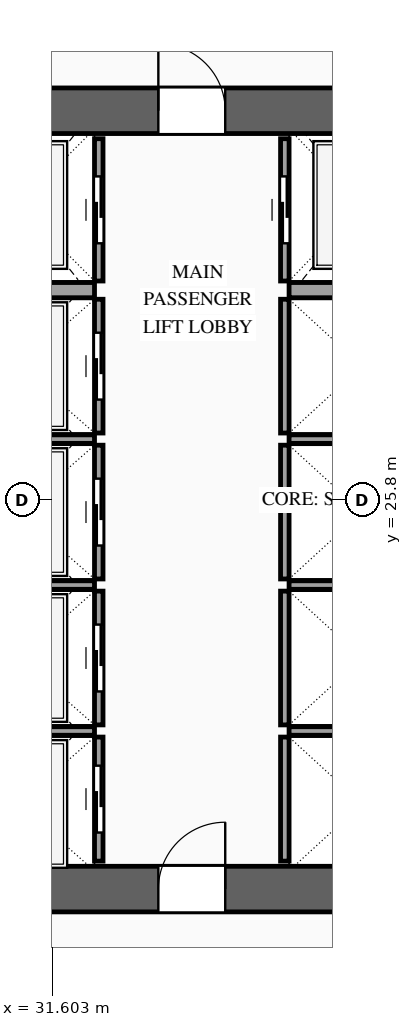
"""IFC4 building model, lengths in metres.
Left out: names, types, materials, properties, quantities, classifications, styles, units other than length and angle.
Written with IfcOpenShell. Run it as: python <this file> out.ifc"""

import sys

from ifc_helpers import new_model, si_unit, direction, frame, frame_2d, origin, place, context, subcontext, project, spatial, rectangle, extrude, source, transform, mapped, element, fill, save


model = new_model("IFC4")
c1 = context("Model", 3, precision=1e-05, world=origin(), true_north=direction((0.0, 1.0)))
c2 = subcontext(c1, "Body", "Model", "MODEL_VIEW")
j1 = project(units=[si_unit("LENGTHUNIT", "METRE"), si_unit("PLANEANGLEUNIT", "RADIAN")], contexts=[c1])
p1 = place(None, origin())
s1 = spatial("IfcSite", under=j1, at=p1, CompositionType="ELEMENT")
p2 = place(p1, origin())
s2 = spatial("IfcBuilding", under=s1, at=p2, CompositionType="ELEMENT")
p3 = place(p2, frame((0.0, 0.0, 159.6)))
s3 = spatial("IfcBuildingStorey", under=s2, at=p3, CompositionType="ELEMENT", Elevation=159.6)
p4 = place(p3, frame((23.425, 19.4, 0.0), z_axis=(0.0, 0.0, 1.0), x_axis=(1.0, 0.0, 0.0)))
e1 = element("IfcWall", 1, at=p4, inside=s3, PredefinedType="SHEAR", context=c2, shape_type="SweptSolid", body=[
    extrude(rectangle(XDim=27.15, YDim=0.75, at=frame_2d((13.575, 0.0))), origin(), (0.0, 0.0, 1.0), 3.6),
])
p5 = place(p4, frame((2.025, 0.0, 0.0)))
e2 = element("IfcOpeningElement", 2, at=p5, cuts=e1, PredefinedType="OPENING", context=c2, shape_type="SweptSolid", body=[
    extrude(rectangle(XDim=1.1, YDim=2.2, at=frame_2d((0.55, 1.1))), frame((0.0, 0.39, 0.0), z_axis=(0.0, -1.0, 0.0), x_axis=(1.0, 0.0, 0.0)), (0.0, 0.0, 1.0), 0.78),
])
p6 = place(p4, frame((9.925, 0.0, 0.0)))
e3 = element("IfcOpeningElement", 3, at=p6, cuts=e1, PredefinedType="OPENING", context=c2, shape_type="SweptSolid", body=[
    extrude(rectangle(XDim=1.1, YDim=2.2, at=frame_2d((0.55, 1.1))), frame((0.0, 0.39, 0.0), z_axis=(0.0, -1.0, 0.0), x_axis=(1.0, 0.0, 0.0)), (0.0, 0.0, 1.0), 0.78),
])
p7 = place(p4, frame((23.125, 0.0, 0.0)))
e4 = element("IfcOpeningElement", 4, at=p7, cuts=e1, PredefinedType="OPENING", context=c2, shape_type="SweptSolid", body=[
    extrude(rectangle(XDim=1.1, YDim=2.2, at=frame_2d((0.55, 1.1))), frame((0.0, 0.39, 0.0), z_axis=(0.0, -1.0, 0.0), x_axis=(1.0, 0.0, 0.0)), (0.0, 0.0, 1.0), 0.78),
])
p8 = place(p4, frame((19.745, 0.0, 0.0)))
e5 = element("IfcOpeningElement", 5, at=p8, cuts=e1, PredefinedType="OPENING", context=c2, shape_type="SweptSolid", body=[
    extrude(rectangle(XDim=0.9, YDim=2.15, at=frame_2d((0.45, 1.075))), frame((0.0, 0.39, 0.0), z_axis=(0.0, -1.0, 0.0), x_axis=(1.0, 0.0, 0.0)), (0.0, 0.0, 1.0), 0.78),
])
p9 = place(p4, frame((18.305, 0.0, 0.0)))
e6 = element("IfcOpeningElement", 6, at=p9, cuts=e1, PredefinedType="OPENING", context=c2, shape_type="SweptSolid", body=[
    extrude(rectangle(XDim=0.9, YDim=2.15, at=frame_2d((0.45, 1.075))), frame((0.0, 0.39, 0.0), z_axis=(0.0, -1.0, 0.0), x_axis=(1.0, 0.0, 0.0)), (0.0, 0.0, 1.0), 0.78),
])
p10 = place(p3, frame((23.425, 32.2, 0.0), z_axis=(0.0, 0.0, 1.0), x_axis=(1.0, 0.0, 0.0)))
e7 = element("IfcWall", 7, at=p10, inside=s3, PredefinedType="SHEAR", context=c2, shape_type="SweptSolid", body=[
    extrude(rectangle(XDim=27.15, YDim=0.75, at=frame_2d((13.575, 0.0))), origin(), (0.0, 0.0, 1.0), 3.6),
])
p11 = place(p10, frame((4.645, 0.0, 0.0)))
e8 = element("IfcOpeningElement", 8, at=p11, cuts=e7, PredefinedType="OPENING", context=c2, shape_type="SweptSolid", body=[
    extrude(rectangle(XDim=0.9, YDim=2.15, at=frame_2d((0.45, 1.075))), frame((0.0, 0.39, 0.0), z_axis=(0.0, -1.0, 0.0), x_axis=(1.0, 0.0, 0.0)), (0.0, 0.0, 1.0), 0.78),
])
p12 = place(p10, frame((9.925, 0.0, 0.0)))
e9 = element("IfcOpeningElement", 9, at=p12, cuts=e7, PredefinedType="OPENING", context=c2, shape_type="SweptSolid", body=[
    extrude(rectangle(XDim=1.1, YDim=2.2, at=frame_2d((0.55, 1.1))), frame((0.0, 0.39, 0.0), z_axis=(0.0, -1.0, 0.0), x_axis=(1.0, 0.0, 0.0)), (0.0, 0.0, 1.0), 0.78),
])
p13 = place(p10, frame((15.775, 0.0, 0.0)))
e10 = element("IfcOpeningElement", 10, at=p13, cuts=e7, PredefinedType="OPENING", context=c2, shape_type="SweptSolid", body=[
    extrude(rectangle(XDim=1.1, YDim=2.2, at=frame_2d((0.55, 1.1))), frame((0.0, 0.39, 0.0), z_axis=(0.0, -1.0, 0.0), x_axis=(1.0, 0.0, 0.0)), (0.0, 0.0, 1.0), 0.78),
])
p14 = place(p10, frame((18.305, 0.0, 0.0)))
e11 = element("IfcOpeningElement", 11, at=p14, cuts=e7, PredefinedType="OPENING", context=c2, shape_type="SweptSolid", body=[
    extrude(rectangle(XDim=0.9, YDim=2.15, at=frame_2d((0.45, 1.075))), frame((0.0, 0.39, 0.0), z_axis=(0.0, -1.0, 0.0), x_axis=(1.0, 0.0, 0.0)), (0.0, 0.0, 1.0), 0.78),
])
p15 = place(p10, frame((19.745, 0.0, 0.0)))
e12 = element("IfcOpeningElement", 12, at=p15, cuts=e7, PredefinedType="OPENING", context=c2, shape_type="SweptSolid", body=[
    extrude(rectangle(XDim=0.9, YDim=2.15, at=frame_2d((0.45, 1.075))), frame((0.0, 0.39, 0.0), z_axis=(0.0, -1.0, 0.0), x_axis=(1.0, 0.0, 0.0)), (0.0, 0.0, 1.0), 0.78),
])
p16 = place(p3, frame((32.37, 19.86, 0.0), z_axis=(0.0, 0.0, 1.0), x_axis=(0.0, 1.0, 0.0)))
e13 = element("IfcWall", 13, at=p16, inside=s3, PredefinedType="SOLIDWALL", context=c2, shape_type="SweptSolid", body=[
    extrude(rectangle(XDim=2.04, YDim=0.14, at=frame_2d((1.02, 0.0))), origin(), (0.0, 0.0, 1.0), 3.38),
])
p17 = place(p16, frame((0.47, 0.0, 0.0)))
e14 = element("IfcOpeningElement", 14, at=p17, cuts=e13, PredefinedType="OPENING", context=c2, shape_type="SweptSolid", body=[
    extrude(rectangle(XDim=1.1, YDim=2.2, at=frame_2d((0.55, 1.1))), frame((0.0, 0.085, 0.0), z_axis=(0.0, -1.0, 0.0), x_axis=(1.0, 0.0, 0.0)), (0.0, 0.0, 1.0), 0.17),
])
m1 = source(origin(), c2, "Body", "SweptSolid", [
    extrude(rectangle(XDim=2.5, YDim=0.14, at=frame_2d((1.25, 0.0))), origin(), (0.0, 0.0, 1.0), 3.38),
])
p18 = place(p3, frame((29.8, 22.0, 0.0), z_axis=(0.0, 0.0, 1.0), x_axis=(1.0, 0.0, 0.0)))
e15 = element("IfcWall", 15, at=p18, inside=s3, PredefinedType="SOLIDWALL", context=c2, shape_type="MappedRepresentation", body=[
    mapped(m1, transform((0.0, 0.0, 0.0), scale=1.0)),
])
p19 = place(p3, frame((32.37, 22.1, 0.0), z_axis=(0.0, 0.0, 1.0), x_axis=(0.0, 1.0, 0.0)))
e16 = element("IfcWall", 16, at=p19, inside=s3, PredefinedType="SOLIDWALL", context=c2, shape_type="SweptSolid", body=[
    extrude(rectangle(XDim=2.2, YDim=0.14, at=frame_2d((1.1, 0.0))), origin(), (0.0, 0.0, 1.0), 3.38),
])
p20 = place(p19, frame((0.55, 0.0, 0.0)))
e17 = element("IfcOpeningElement", 17, at=p20, cuts=e16, PredefinedType="OPENING", context=c2, shape_type="SweptSolid", body=[
    extrude(rectangle(XDim=1.1, YDim=2.2, at=frame_2d((0.55, 1.1))), frame((0.0, 0.085, 0.0), z_axis=(0.0, -1.0, 0.0), x_axis=(1.0, 0.0, 0.0)), (0.0, 0.0, 1.0), 0.17),
])
p21 = place(p3, frame((29.8, 24.4, 0.0), z_axis=(0.0, 0.0, 1.0), x_axis=(1.0, 0.0, 0.0)))
e18 = element("IfcWall", 18, at=p21, inside=s3, PredefinedType="SOLIDWALL", context=c2, shape_type="MappedRepresentation", body=[
    mapped(m1, transform((0.0, 0.0, 0.0), scale=1.0)),
])
p22 = place(p3, frame((32.37, 24.5, 0.0), z_axis=(0.0, 0.0, 1.0), x_axis=(0.0, 1.0, 0.0)))
e19 = element("IfcWall", 19, at=p22, inside=s3, PredefinedType="SOLIDWALL", context=c2, shape_type="SweptSolid", body=[
    extrude(rectangle(XDim=2.2, YDim=0.14, at=frame_2d((1.1, 0.0))), origin(), (0.0, 0.0, 1.0), 3.38),
])
p23 = place(p22, frame((0.55, 0.0, 0.0)))
e20 = element("IfcOpeningElement", 20, at=p23, cuts=e19, PredefinedType="OPENING", context=c2, shape_type="SweptSolid", body=[
    extrude(rectangle(XDim=1.1, YDim=2.2, at=frame_2d((0.55, 1.1))), frame((0.0, 0.085, 0.0), z_axis=(0.0, -1.0, 0.0), x_axis=(1.0, 0.0, 0.0)), (0.0, 0.0, 1.0), 0.17),
])
p24 = place(p3, frame((29.8, 26.8, 0.0), z_axis=(0.0, 0.0, 1.0), x_axis=(1.0, 0.0, 0.0)))
e21 = element("IfcWall", 21, at=p24, inside=s3, PredefinedType="SOLIDWALL", context=c2, shape_type="MappedRepresentation", body=[
    mapped(m1, transform((0.0, 0.0, 0.0), scale=1.0)),
])
p25 = place(p3, frame((32.37, 26.9, 0.0), z_axis=(0.0, 0.0, 1.0), x_axis=(0.0, 1.0, 0.0)))
e22 = element("IfcWall", 22, at=p25, inside=s3, PredefinedType="SOLIDWALL", context=c2, shape_type="SweptSolid", body=[
    extrude(rectangle(XDim=2.2, YDim=0.14, at=frame_2d((1.1, 0.0))), origin(), (0.0, 0.0, 1.0), 3.38),
])
p26 = place(p25, frame((0.55, 0.0, 0.0)))
e23 = element("IfcOpeningElement", 23, at=p26, cuts=e22, PredefinedType="OPENING", context=c2, shape_type="SweptSolid", body=[
    extrude(rectangle(XDim=1.1, YDim=2.2, at=frame_2d((0.55, 1.1))), frame((0.0, 0.085, 0.0), z_axis=(0.0, -1.0, 0.0), x_axis=(1.0, 0.0, 0.0)), (0.0, 0.0, 1.0), 0.17),
])
p27 = place(p3, frame((32.37, 29.4, 0.0), z_axis=(0.0, 0.0, 1.0), x_axis=(0.0, 1.0, 0.0)))
e24 = element("IfcWall", 24, at=p27, inside=s3, PredefinedType="SOLIDWALL", context=c2, shape_type="SweptSolid", body=[
    extrude(rectangle(XDim=2.34, YDim=0.14, at=frame_2d((1.17, 0.0))), origin(), (0.0, 0.0, 1.0), 3.38),
])
p28 = place(p27, frame((0.62, 0.0, 0.0)))
e25 = element("IfcOpeningElement", 25, at=p28, cuts=e24, PredefinedType="OPENING", context=c2, shape_type="SweptSolid", body=[
    extrude(rectangle(XDim=1.1, YDim=2.2, at=frame_2d((0.55, 1.1))), frame((0.0, 0.085, 0.0), z_axis=(0.0, -1.0, 0.0), x_axis=(1.0, 0.0, 0.0)), (0.0, 0.0, 1.0), 0.17),
])
m2 = source(origin(), c2, "Body", "SweptSolid", [
    extrude(rectangle(XDim=2.5, YDim=0.25, at=frame_2d((1.25, 0.0))), origin(), (0.0, 0.0, 1.0), 3.38),
])
p29 = place(p3, frame((29.8, 29.25, 0.0), z_axis=(0.0, 0.0, 1.0), x_axis=(1.0, 0.0, 0.0)))
e26 = element("IfcWall", 26, at=p29, inside=s3, PredefinedType="SOLIDWALL", context=c2, shape_type="MappedRepresentation", body=[
    mapped(m2, transform((0.0, 0.0, 0.0), scale=1.0)),
])
m3 = source(origin(), c2, "Body", "SweptSolid", [
    extrude(rectangle(XDim=2.04, YDim=0.14, at=frame_2d((1.02, 0.0))), origin(), (0.0, 0.0, 1.0), 3.38),
])
p30 = place(p3, frame((35.43, 19.86, 0.0), z_axis=(0.0, 0.0, 1.0), x_axis=(0.0, 1.0, 0.0)))
e27 = element("IfcWall", 27, at=p30, inside=s3, PredefinedType="SOLIDWALL", context=c2, shape_type="MappedRepresentation", body=[
    mapped(m3, transform((0.0, 0.0, 0.0), scale=1.0)),
])
m4 = source(origin(), c2, "Body", "SweptSolid", [
    extrude(rectangle(XDim=2.4, YDim=0.14, at=frame_2d((1.2, 0.0))), origin(), (0.0, 0.0, 1.0), 3.38),
])
p31 = place(p3, frame((35.5, 22.0, 0.0), z_axis=(0.0, 0.0, 1.0), x_axis=(1.0, 0.0, 0.0)))
e28 = element("IfcWall", 28, at=p31, inside=s3, PredefinedType="SOLIDWALL", context=c2, shape_type="MappedRepresentation", body=[
    mapped(m4, transform((0.0, 0.0, 0.0), scale=1.0)),
])
m5 = source(origin(), c2, "Body", "SweptSolid", [
    extrude(rectangle(XDim=2.2, YDim=0.14, at=frame_2d((1.1, 0.0))), origin(), (0.0, 0.0, 1.0), 3.38),
])
p32 = place(p3, frame((35.43, 22.1, 0.0), z_axis=(0.0, 0.0, 1.0), x_axis=(0.0, 1.0, 0.0)))
e29 = element("IfcWall", 29, at=p32, inside=s3, PredefinedType="SOLIDWALL", context=c2, shape_type="MappedRepresentation", body=[
    mapped(m5, transform((0.0, 0.0, 0.0), scale=1.0)),
])
p33 = place(p3, frame((35.5, 24.4, 0.0), z_axis=(0.0, 0.0, 1.0), x_axis=(1.0, 0.0, 0.0)))
e30 = element("IfcWall", 30, at=p33, inside=s3, PredefinedType="SOLIDWALL", context=c2, shape_type="MappedRepresentation", body=[
    mapped(m4, transform((0.0, 0.0, 0.0), scale=1.0)),
])
p34 = place(p3, frame((35.43, 24.5, 0.0), z_axis=(0.0, 0.0, 1.0), x_axis=(0.0, 1.0, 0.0)))
e31 = element("IfcWall", 31, at=p34, inside=s3, PredefinedType="SOLIDWALL", context=c2, shape_type="MappedRepresentation", body=[
    mapped(m5, transform((0.0, 0.0, 0.0), scale=1.0)),
])
p35 = place(p3, frame((35.5, 26.8, 0.0), z_axis=(0.0, 0.0, 1.0), x_axis=(1.0, 0.0, 0.0)))
e32 = element("IfcWall", 32, at=p35, inside=s3, PredefinedType="SOLIDWALL", context=c2, shape_type="MappedRepresentation", body=[
    mapped(m4, transform((0.0, 0.0, 0.0), scale=1.0)),
])
m6 = source(origin(), c2, "Body", "SweptSolid", [
    extrude(rectangle(XDim=2.2, YDim=0.14, at=frame_2d((1.1, 0.0))), origin(), (0.0, 0.0, 1.0), 3.38),
])
p36 = place(p3, frame((35.43, 26.9, 0.0), z_axis=(0.0, 0.0, 1.0), x_axis=(0.0, 1.0, 0.0)))
e33 = element("IfcWall", 33, at=p36, inside=s3, PredefinedType="SOLIDWALL", context=c2, shape_type="MappedRepresentation", body=[
    mapped(m6, transform((0.0, 0.0, 0.0), scale=1.0)),
])
p37 = place(p3, frame((35.43, 29.4, 0.0), z_axis=(0.0, 0.0, 1.0), x_axis=(0.0, 1.0, 0.0)))
e34 = element("IfcWall", 34, at=p37, inside=s3, PredefinedType="SOLIDWALL", context=c2, shape_type="SweptSolid", body=[
    extrude(rectangle(XDim=2.34, YDim=0.14, at=frame_2d((1.17, 0.0))), origin(), (0.0, 0.0, 1.0), 3.38),
])
p38 = place(p37, frame((0.62, 0.0, 0.0)))
e35 = element("IfcOpeningElement", 35, at=p38, cuts=e34, PredefinedType="OPENING", context=c2, shape_type="SweptSolid", body=[
    extrude(rectangle(XDim=1.1, YDim=2.2, at=frame_2d((0.55, 1.1))), frame((0.0, 0.085, 0.0), z_axis=(0.0, -1.0, 0.0), x_axis=(1.0, 0.0, 0.0)), (0.0, 0.0, 1.0), 0.17),
])
m7 = source(origin(), c2, "Body", "SweptSolid", [
    extrude(rectangle(XDim=2.4, YDim=0.25, at=frame_2d((1.2, 0.0))), origin(), (0.0, 0.0, 1.0), 3.38),
])
p39 = place(p3, frame((35.5, 29.25, 0.0), z_axis=(0.0, 0.0, 1.0), x_axis=(1.0, 0.0, 0.0)))
e36 = element("IfcWall", 36, at=p39, inside=s3, PredefinedType="SOLIDWALL", context=c2, shape_type="MappedRepresentation", body=[
    mapped(m7, transform((0.0, 0.0, 0.0), scale=1.0)),
])
m8 = source(origin(), c2, "Body", "SweptSolid", [
    extrude(rectangle(XDim=1.1, YDim=2.2, at=frame_2d((0.55, 1.1))), frame((0.0, 0.025, 0.0), z_axis=(0.0, -1.0, 0.0), x_axis=(1.0, 0.0, 0.0)), (0.0, 0.0, 1.0), 0.05),
])
p40 = place(p17, origin())
e37 = element("IfcDoor", 37, at=p40, inside=s3, OperationType="SLIDING_TO_LEFT", PredefinedType="DOOR", context=c2, shape_type="MappedRepresentation", body=[
    mapped(m8, transform((0.0, 0.0, 0.0), scale=1.0)),
])
fill(e14, e37)
p41 = place(p20, origin())
e38 = element("IfcDoor", 38, at=p41, inside=s3, OperationType="SLIDING_TO_RIGHT", PredefinedType="DOOR", context=c2, shape_type="MappedRepresentation", body=[
    mapped(m8, transform((0.0, 0.0, 0.0), scale=1.0)),
])
fill(e17, e38)
p42 = place(p23, origin())
e39 = element("IfcDoor", 39, at=p42, inside=s3, OperationType="SLIDING_TO_LEFT", PredefinedType="DOOR", context=c2, shape_type="MappedRepresentation", body=[
    mapped(m8, transform((0.0, 0.0, 0.0), scale=1.0)),
])
fill(e20, e39)
p43 = place(p26, origin())
e40 = element("IfcDoor", 40, at=p43, inside=s3, OperationType="SLIDING_TO_RIGHT", PredefinedType="DOOR", context=c2, shape_type="MappedRepresentation", body=[
    mapped(m8, transform((0.0, 0.0, 0.0), scale=1.0)),
])
fill(e23, e40)
p44 = place(p28, origin())
e41 = element("IfcDoor", 41, at=p44, inside=s3, OperationType="SLIDING_TO_LEFT", PredefinedType="DOOR", context=c2, shape_type="MappedRepresentation", body=[
    mapped(m8, transform((0.0, 0.0, 0.0), scale=1.0)),
])
fill(e25, e41)
p45 = place(p38, origin())
e42 = element("IfcDoor", 42, at=p45, inside=s3, OperationType="SLIDING_TO_RIGHT", PredefinedType="DOOR", context=c2, shape_type="MappedRepresentation", body=[
    mapped(m8, transform((0.0, 0.0, 0.0), scale=1.0)),
])
fill(e35, e42)
m9 = source(origin(), c2, "Body", "SweptSolid", [
    extrude(rectangle(XDim=1.1, YDim=2.2, at=frame_2d((0.55, 1.1))), frame((0.0, 0.025, 0.0), z_axis=(0.0, -1.0, 0.0), x_axis=(1.0, 0.0, 0.0)), (0.0, 0.0, 1.0), 0.05),
])
p46 = place(p6, origin())
e43 = element("IfcDoor", 43, at=p46, inside=s3, OperationType="SINGLE_SWING_RIGHT", PredefinedType="DOOR", context=c2, shape_type="MappedRepresentation", body=[
    mapped(m9, transform((0.0, 0.0, 0.0), scale=1.0)),
])
fill(e3, e43)
p47 = place(p12, origin())
e44 = element("IfcDoor", 44, at=p47, inside=s3, OperationType="SINGLE_SWING_LEFT", PredefinedType="DOOR", context=c2, shape_type="MappedRepresentation", body=[
    mapped(m9, transform((0.0, 0.0, 0.0), scale=1.0)),
])
fill(e9, e44)
save(model, sys.argv[1])
